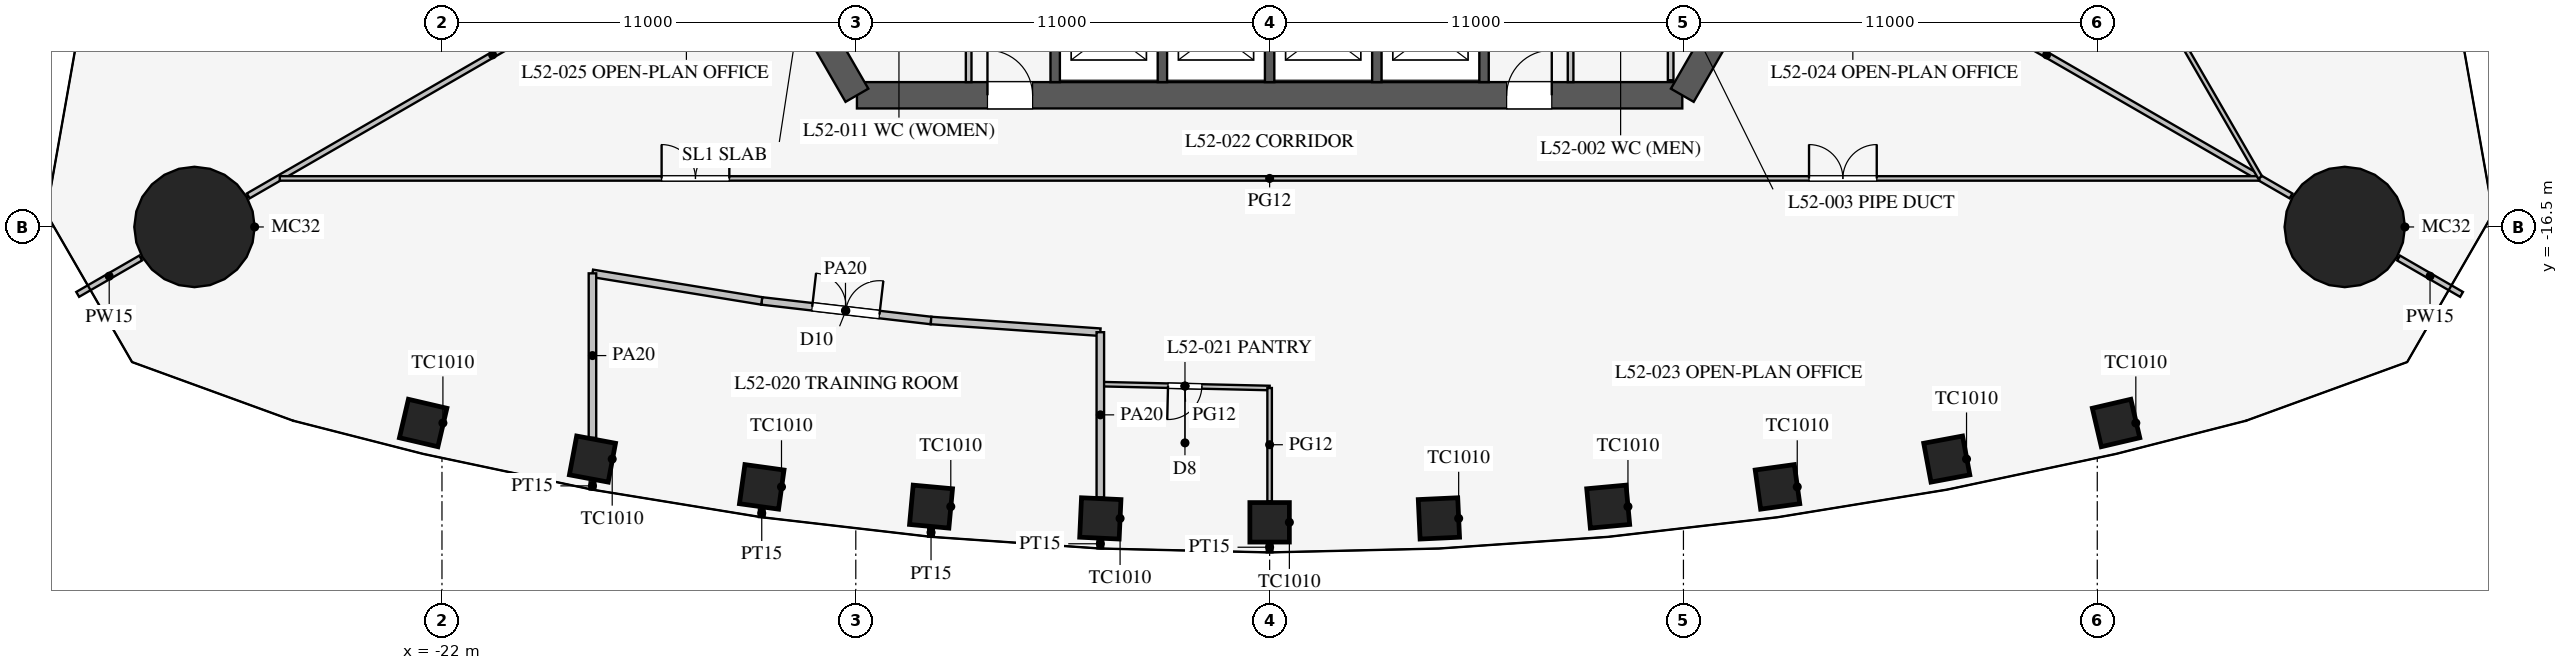
"""IFC4 building model, lengths in metres.
Left out: names, types, materials, properties, quantities, classifications, styles, units other than length and angle.
Written with IfcOpenShell. Run it as: python <this file> out.ifc"""

import sys

from ifc_helpers import new_model, si_unit, direction, frame, frame_2d, origin, origin_2d, place, context, subcontext, project, spatial, rectangle, circle, extrude, element, fill, save


model = new_model("IFC4")
c1 = context("Model", 3, precision=1e-05, world=origin(), true_north=direction((0.0, 1.0)))
c2 = subcontext(c1, "Body", "Model", "MODEL_VIEW")
j1 = project(units=[si_unit("LENGTHUNIT", "METRE"), si_unit("PLANEANGLEUNIT", "RADIAN")], contexts=[c1])
p1 = place(None, origin())
s1 = spatial("IfcSite", under=j1, at=p1, CompositionType="ELEMENT")
p2 = place(p1, origin())
s2 = spatial("IfcBuilding", under=s1, at=p2, CompositionType="ELEMENT")
p3 = place(p2, frame((0.0, 0.0, 227.5)))
s3 = spatial("IfcBuildingStorey", under=s2, at=p3, CompositionType="ELEMENT", Elevation=227.5)
for number, where, z_axis, x_axis in (
    (1, (-22.5, -21.71, 0.0), (0.0, 0.0, 1.0), (0.974, -0.227, 0.0)),
    (2, (-18.0, -22.669, 0.0), (0.0, 0.0, 1.0), (0.983, -0.184, 0.0)),
    (3, (-13.5, -23.408, 0.0), (0.0, 0.0, 1.0), (0.99, -0.138, 0.0)),
    (4, (-9.0, -23.933, 0.0), (0.0, 0.0, 1.0), (0.996, -0.092, 0.0)),
    (5, (-4.5, -24.246, 0.0), (0.0, 0.0, 1.0), (0.999, -0.046, 0.0)),
    (6, (0.0, -24.351, 0.0), (0.0, 0.0, 1.0), (1.0, 0.0, 0.0)),
    (7, (4.5, -24.246, 0.0), (0.0, 0.0, 1.0), (0.999, 0.046, 0.0)),
    (8, (9.0, -23.933, 0.0), (0.0, 0.0, 1.0), (0.996, 0.092, 0.0)),
    (9, (13.5, -23.408, 0.0), (0.0, 0.0, 1.0), (0.99, 0.138, 0.0)),
    (10, (18.0, -22.669, 0.0), (0.0, 0.0, 1.0), (0.983, 0.184, 0.0)),
    (11, (22.5, -21.71, 0.0), (0.0, 0.0, 1.0), (0.974, 0.227, 0.0)),
):
    element("IfcColumn", number, at=place(p3, frame(where, z_axis=z_axis, x_axis=x_axis)), inside=s3, PredefinedType="COLUMN", context=c2, shape_type="SweptSolid", body=[
        extrude(rectangle(XDim=1.05, YDim=1.05, at=origin_2d()), origin(), (0.0, 0.0, 1.0), 4.2),
    ])
for number, where, z_axis, x_axis in (
    (12, (28.579, -16.5, 0.0), (0.0, 0.0, 1.0), (1.0, 0.0, 0.0)),
    (13, (-28.579, -16.5, 0.0), (0.0, 0.0, 1.0), (1.0, 0.0, 0.0)),
):
    element("IfcColumn", number, at=place(p3, frame(where, z_axis=z_axis, x_axis=x_axis)), inside=s3, PredefinedType="COLUMN", context=c2, shape_type="SweptSolid", body=[
        extrude(circle(Radius=1.6, at=origin_2d()), origin(), (0.0, 0.0, 1.0), 4.2),
    ])
p4 = place(p3, frame((-10.97, -13.0, 0.0), z_axis=(0.0, 0.0, 1.0), x_axis=(1.0, 0.0, 0.0)))
e14 = element("IfcWall", 14, at=p4, inside=s3, PredefinedType="SHEAR", context=c2, shape_type="SweptSolid", body=[
    extrude(rectangle(XDim=21.939, YDim=0.7, at=frame_2d((10.97, 0.0))), origin(), (0.0, 0.0, 1.0), 4.2),
])
p5 = place(p4, frame((17.27, 0.0, 0.0)))
e15 = element("IfcOpeningElement", 15, at=p5, cuts=e14, PredefinedType="OPENING", context=c2, shape_type="SweptSolid", body=[
    extrude(rectangle(XDim=1.2, YDim=2.1, at=frame_2d((0.6, 1.05))), frame((0.0, 0.36, 0.0), z_axis=(0.0, -1.0, 0.0), x_axis=(1.0, 0.0, 0.0)), (0.0, 0.0, 1.0), 0.72),
])
p6 = place(p4, frame((3.47, 0.0, 0.0)))
e16 = element("IfcOpeningElement", 16, at=p6, cuts=e14, PredefinedType="OPENING", context=c2, shape_type="SweptSolid", body=[
    extrude(rectangle(XDim=1.2, YDim=2.1, at=frame_2d((0.6, 1.05))), frame((0.0, 0.36, 0.0), z_axis=(0.0, -1.0, 0.0), x_axis=(1.0, 0.0, 0.0)), (0.0, 0.0, 1.0), 0.72),
])
for number, where, z_axis, x_axis in (
    (17, (10.97, -13.0, 0.0), (0.0, 0.0, 1.0), (0.5, 0.866, 0.0)),
    (18, (-16.743, -3.0, 0.0), (0.0, 0.0, 1.0), (0.5, -0.866, 0.0)),
):
    element("IfcWall", number, at=place(p3, frame(where, z_axis=z_axis, x_axis=x_axis)), inside=s3, PredefinedType="SHEAR", context=c2, shape_type="SweptSolid", body=[
        extrude(rectangle(XDim=11.547, YDim=0.7, at=frame_2d((5.773, 0.0))), origin(), (0.0, 0.0, 1.0), 4.2),
    ])
for number, where, z_axis, x_axis in (
    (19, (-5.7, -10.025, 0.0), (0.0, 0.0, 1.0), (0.0, -1.0, 0.0)),
    (20, (-2.85, -10.025, 0.0), (0.0, 0.0, 1.0), (0.0, -1.0, 0.0)),
    (21, (0.0, -10.025, 0.0), (0.0, 0.0, 1.0), (0.0, -1.0, 0.0)),
    (22, (2.85, -10.025, 0.0), (0.0, 0.0, 1.0), (0.0, -1.0, 0.0)),
    (23, (5.7, -10.025, 0.0), (0.0, 0.0, 1.0), (0.0, -1.0, 0.0)),
):
    element("IfcWall", number, at=place(p3, frame(where, z_axis=z_axis, x_axis=x_axis)), inside=s3, PredefinedType="SHEAR", context=c2, shape_type="SweptSolid", body=[
        extrude(rectangle(XDim=2.625, YDim=0.25, at=frame_2d((1.312, 0.0))), origin(), (0.0, 0.0, 1.0), 4.2),
    ])
p7 = place(p3, frame((8.0, -7.5, 0.0), z_axis=(0.0, 0.0, 1.0), x_axis=(0.0, -1.0, 0.0)))
e24 = element("IfcWall", 24, at=p7, inside=s3, PredefinedType="PARTITIONING", context=c2, shape_type="SweptSolid", body=[
    extrude(rectangle(XDim=5.15, YDim=0.15, at=frame_2d((2.575, 0.0))), origin(), (0.0, 0.0, 1.0), 4.0),
])
p8 = place(p7, frame((1.3, 0.0, 0.0)))
e25 = element("IfcOpeningElement", 25, at=p8, cuts=e24, PredefinedType="OPENING", context=c2, shape_type="SweptSolid", body=[
    extrude(rectangle(XDim=0.9, YDim=2.1, at=frame_2d((0.45, 1.05))), frame((0.0, 0.085, 0.0), z_axis=(0.0, -1.0, 0.0), x_axis=(1.0, 0.0, 0.0)), (0.0, 0.0, 1.0), 0.17),
])
p9 = place(p3, frame((-8.0, -7.5, 0.0), z_axis=(0.0, 0.0, 1.0), x_axis=(0.0, -1.0, 0.0)))
e26 = element("IfcWall", 26, at=p9, inside=s3, PredefinedType="PARTITIONING", context=c2, shape_type="SweptSolid", body=[
    extrude(rectangle(XDim=5.15, YDim=0.15, at=frame_2d((2.575, 0.0))), origin(), (0.0, 0.0, 1.0), 4.0),
])
p10 = place(p9, frame((2.6, 0.0, 0.0)))
e27 = element("IfcOpeningElement", 27, at=p10, cuts=e26, PredefinedType="OPENING", context=c2, shape_type="SweptSolid", body=[
    extrude(rectangle(XDim=0.9, YDim=2.1, at=frame_2d((0.45, 1.05))), frame((0.0, 0.085, 0.0), z_axis=(0.0, -1.0, 0.0), x_axis=(1.0, 0.0, 0.0)), (0.0, 0.0, 1.0), 0.17),
])
p11 = place(p3, frame((10.66, -8.5, 0.0), z_axis=(0.0, 0.0, 1.0), x_axis=(0.0, -1.0, 0.0)))
e28 = element("IfcWall", 28, at=p11, inside=s3, PredefinedType="PARTITIONING", context=c2, shape_type="SweptSolid", body=[
    extrude(rectangle(XDim=4.1, YDim=0.15, at=frame_2d((2.05, 0.0))), origin(), (0.0, 0.0, 1.0), 4.0),
])
p12 = place(p3, frame((14.159, -8.175, 0.0), z_axis=(0.0, 0.0, 1.0), x_axis=(0.866027028085, -0.499997186618, 0.0)))
e29 = element("IfcWall", 29, at=p12, inside=s3, PredefinedType="PARTITIONING", context=c2, shape_type="SweptSolid", body=[
    extrude(rectangle(XDim=15.0, YDim=0.15, at=frame_2d((7.5, 0.0))), origin(), (0.0, 0.0, 1.0), 2.4),
])
p13 = place(p3, frame((30.008, -17.325, 0.0), z_axis=(0.0, 0.0, 1.0), x_axis=(0.866013246922, -0.500021055713, 0.0)))
e30 = element("IfcWall", 30, at=p13, inside=s3, PredefinedType="PARTITIONING", context=c2, shape_type="SweptSolid", body=[
    extrude(rectangle(XDim=1.935, YDim=0.15, at=frame_2d((0.967, 0.0))), origin(), (0.0, 0.0, 1.0), 2.4),
])
p14 = place(p3, frame((-14.159, -8.175, 0.0), z_axis=(0.0, 0.0, 1.0), x_axis=(-0.866027028085, -0.499997186618, 0.0)))
e31 = element("IfcWall", 31, at=p14, inside=s3, PredefinedType="PARTITIONING", context=c2, shape_type="SweptSolid", body=[
    extrude(rectangle(XDim=15.0, YDim=0.15, at=frame_2d((7.5, 0.0))), origin(), (0.0, 0.0, 1.0), 2.4),
])
p15 = place(p3, frame((-30.008, -17.325, 0.0), z_axis=(0.0, 0.0, 1.0), x_axis=(-0.866013246922, -0.500021055713, 0.0)))
e32 = element("IfcWall", 32, at=p15, inside=s3, PredefinedType="PARTITIONING", context=c2, shape_type="SweptSolid", body=[
    extrude(rectangle(XDim=1.935, YDim=0.15, at=frame_2d((0.967, 0.0))), origin(), (0.0, 0.0, 1.0), 2.4),
])
p16 = place(p3, frame((-26.312, -15.21, 0.0), z_axis=(0.0, 0.0, 1.0), x_axis=(1.0, 0.0, 0.0)))
e33 = element("IfcWall", 33, at=p16, inside=s3, PredefinedType="PARTITIONING", context=c2, shape_type="SweptSolid", body=[
    extrude(rectangle(XDim=52.624, YDim=0.12, at=frame_2d((26.312, 0.0))), origin(), (0.0, 0.0, 1.0), 2.9),
])
p17 = place(p16, frame((10.15, 0.0, 0.15)))
e34 = element("IfcOpeningElement", 34, at=p17, cuts=e33, PredefinedType="OPENING", context=c2, shape_type="SweptSolid", body=[
    extrude(rectangle(XDim=1.8, YDim=2.1, at=frame_2d((0.9, 1.05))), frame((0.0, 0.07, 0.0), z_axis=(0.0, -1.0, 0.0), x_axis=(1.0, 0.0, 0.0)), (0.0, 0.0, 1.0), 0.14),
])
p18 = place(p16, frame((40.65, 0.0, 0.15)))
e35 = element("IfcOpeningElement", 35, at=p18, cuts=e33, PredefinedType="OPENING", context=c2, shape_type="SweptSolid", body=[
    extrude(rectangle(XDim=1.8, YDim=2.1, at=frame_2d((0.9, 1.05))), frame((0.0, 0.07, 0.0), z_axis=(0.0, -1.0, 0.0), x_axis=(1.0, 0.0, 0.0)), (0.0, 0.0, 1.0), 0.14),
])
p19 = place(p3, frame((0.0, -24.88, 0.0), z_axis=(0.0, 0.0, 1.0), x_axis=(0.0, -1.0, 0.0)))
e36 = element("IfcWall", 36, at=p19, inside=s3, PredefinedType="PARTITIONING", context=c2, shape_type="SweptSolid", body=[
    extrude(rectangle(XDim=0.266, YDim=0.15, at=frame_2d((0.133, 0.0))), origin(), (0.0, 0.0, 1.0), 2.9),
])
p20 = place(p3, frame((-13.5, -24.005, 0.0), z_axis=(0.0, 0.0, 1.0), x_axis=(0.0, -1.0, 0.0)))
e37 = element("IfcWall", 37, at=p20, inside=s3, PredefinedType="PARTITIONING", context=c2, shape_type="SweptSolid", body=[
    extrude(rectangle(XDim=0.206, YDim=0.15, at=frame_2d((0.103, 0.0))), origin(), (0.0, 0.0, 1.0), 2.9),
])
p21 = place(p3, frame((-18.0, -23.286, 0.0), z_axis=(0.0, 0.0, 1.0), x_axis=(0.0, -1.0, 0.0)))
e38 = element("IfcWall", 38, at=p21, inside=s3, PredefinedType="PARTITIONING", context=c2, shape_type="SweptSolid", body=[
    extrude(rectangle(XDim=0.192, YDim=0.15, at=frame_2d((0.096, 0.0))), origin(), (0.0, 0.0, 1.0), 2.9),
])
p22 = place(p3, frame((-4.5, -24.799, 0.0), z_axis=(0.0, 0.0, 1.0), x_axis=(0.0, -1.0, 0.0)))
e39 = element("IfcWall", 39, at=p22, inside=s3, PredefinedType="PARTITIONING", context=c2, shape_type="SweptSolid", body=[
    extrude(rectangle(XDim=0.243, YDim=0.15, at=frame_2d((0.122, 0.0))), origin(), (0.0, 0.0, 1.0), 2.9),
])
p23 = place(p3, frame((-9.0, -24.508, 0.0), z_axis=(0.0, 0.0, 1.0), x_axis=(0.0, -1.0, 0.0)))
e40 = element("IfcWall", 40, at=p23, inside=s3, PredefinedType="PARTITIONING", context=c2, shape_type="SweptSolid", body=[
    extrude(rectangle(XDim=0.223, YDim=0.15, at=frame_2d((0.112, 0.0))), origin(), (0.0, 0.0, 1.0), 2.9),
])
p24 = place(p3, frame((-13.5, -18.466, 0.0), z_axis=(0.0, 0.0, 1.0), x_axis=(0.993382946625, -0.114849124309, 0.0)))
e41 = element("IfcWall", 41, at=p24, inside=s3, PredefinedType="PARTITIONING", context=c2, shape_type="SweptSolid", body=[
    extrude(rectangle(XDim=4.53, YDim=0.2, at=frame_2d((2.265, 0.0))), origin(), (0.0, 0.0, 1.0), 2.9),
])
p25 = place(p24, frame((1.35, 0.0, 0.15)))
e42 = element("IfcOpeningElement", 42, at=p25, cuts=e41, PredefinedType="OPENING", context=c2, shape_type="SweptSolid", body=[
    extrude(rectangle(XDim=1.8, YDim=2.1, at=frame_2d((0.9, 1.05))), frame((0.0, 0.11, 0.0), z_axis=(0.0, -1.0, 0.0), x_axis=(1.0, 0.0, 0.0)), (0.0, 0.0, 1.0), 0.22),
])
p26 = place(p3, frame((-18.0, -17.733, 0.0), z_axis=(0.0, 0.0, 1.0), x_axis=(0.986986525477, -0.160802980469, 0.0)))
e43 = element("IfcWall", 43, at=p26, inside=s3, PredefinedType="PARTITIONING", context=c2, shape_type="SweptSolid", body=[
    extrude(rectangle(XDim=4.559, YDim=0.2, at=frame_2d((2.28, 0.0))), origin(), (0.0, 0.0, 1.0), 2.9),
])
p27 = place(p3, frame((-4.5, -20.677, 0.0), z_axis=(0.0, 0.0, 1.0), x_axis=(0.99973677065, -0.022943177842, 0.0)))
e44 = element("IfcWall", 44, at=p27, inside=s3, PredefinedType="PARTITIONING", context=c2, shape_type="SweptSolid", body=[
    extrude(rectangle(XDim=4.501, YDim=0.12, at=frame_2d((2.25, 0.0))), origin(), (0.0, 0.0, 1.0), 2.9),
])
p28 = place(p27, frame((1.8, 0.0, 0.15)))
e45 = element("IfcOpeningElement", 45, at=p28, cuts=e44, PredefinedType="OPENING", context=c2, shape_type="SweptSolid", body=[
    extrude(rectangle(XDim=0.9, YDim=2.1, at=frame_2d((0.45, 1.05))), frame((0.0, 0.07, 0.0), z_axis=(0.0, -1.0, 0.0), x_axis=(1.0, 0.0, 0.0)), (0.0, 0.0, 1.0), 0.14),
])
p29 = place(p3, frame((-9.0, -18.986, 0.0), z_axis=(0.0, 0.0, 1.0), x_axis=(0.997623533978, -0.068900540297, 0.0)))
e46 = element("IfcWall", 46, at=p29, inside=s3, PredefinedType="PARTITIONING", context=c2, shape_type="SweptSolid", body=[
    extrude(rectangle(XDim=4.511, YDim=0.2, at=frame_2d((2.255, 0.0))), origin(), (0.0, 0.0, 1.0), 2.9),
])
p30 = place(p3, frame((0.0, -20.781, 0.0), z_axis=(0.0, 0.0, 1.0), x_axis=(0.0, -1.0, 0.0)))
e47 = element("IfcWall", 47, at=p30, inside=s3, PredefinedType="PARTITIONING", context=c2, shape_type="SweptSolid", body=[
    extrude(rectangle(XDim=3.015, YDim=0.12, at=frame_2d((1.508, 0.0))), origin(), (0.0, 0.0, 1.0), 2.9),
])
p31 = place(p3, frame((-18.0, -17.733, 0.0), z_axis=(0.0, 0.0, 1.0), x_axis=(0.0, -1.0, 0.0)))
e48 = element("IfcWall", 48, at=p31, inside=s3, PredefinedType="PARTITIONING", context=c2, shape_type="SweptSolid", body=[
    extrude(rectangle(XDim=4.372, YDim=0.2, at=frame_2d((2.186, 0.0))), origin(), (0.0, 0.0, 1.0), 2.9),
])
p32 = place(p3, frame((-4.5, -19.297, 0.0), z_axis=(0.0, 0.0, 1.0), x_axis=(0.0, -1.0, 0.0)))
e49 = element("IfcWall", 49, at=p32, inside=s3, PredefinedType="PARTITIONING", context=c2, shape_type="SweptSolid", body=[
    extrude(rectangle(XDim=4.394, YDim=0.2, at=frame_2d((2.197, 0.0))), origin(), (0.0, 0.0, 1.0), 2.9),
])
p33 = place(p3, frame((26.328, -15.182, 0.0), z_axis=(0.0, 0.0, 1.0), x_axis=(-0.500000626146, 0.866025042278, 0.0)))
e50 = element("IfcWall", 50, at=p33, inside=s3, PredefinedType="PARTITIONING", context=c2, shape_type="SweptSolid", body=[
    extrude(rectangle(XDim=52.624, YDim=0.12, at=frame_2d((26.312, 0.0))), origin(), (0.0, 0.0, 1.0), 2.9),
])
p34 = place(p33, frame((10.15, 0.0, 0.15)))
e51 = element("IfcOpeningElement", 51, at=p34, cuts=e50, PredefinedType="OPENING", context=c2, shape_type="SweptSolid", body=[
    extrude(rectangle(XDim=1.8, YDim=2.1, at=frame_2d((0.9, 1.05))), frame((0.0, 0.07, 0.0), z_axis=(0.0, -1.0, 0.0), x_axis=(1.0, 0.0, 0.0)), (0.0, 0.0, 1.0), 0.14),
])
p35 = place(p33, frame((40.65, 0.0, 0.15)))
e52 = element("IfcOpeningElement", 52, at=p35, cuts=e50, PredefinedType="OPENING", context=c2, shape_type="SweptSolid", body=[
    extrude(rectangle(XDim=1.8, YDim=2.1, at=frame_2d((0.9, 1.05))), frame((0.0, 0.07, 0.0), z_axis=(0.0, -1.0, 0.0), x_axis=(1.0, 0.0, 0.0)), (0.0, 0.0, 1.0), 0.14),
])
p36 = place(p5, origin())
e53 = element("IfcDoor", 53, at=p36, inside=s3, OperationType="SINGLE_SWING_RIGHT", PredefinedType="DOOR", context=c2, shape_type="SweptSolid", body=[
    extrude(rectangle(XDim=1.2, YDim=2.1, at=frame_2d((0.6, 1.05))), frame((0.0, 0.025, 0.0), z_axis=(0.0, -1.0, 0.0), x_axis=(1.0, 0.0, 0.0)), (0.0, 0.0, 1.0), 0.05),
])
fill(e15, e53)
p37 = place(p6, origin())
e54 = element("IfcDoor", 54, at=p37, inside=s3, OperationType="SINGLE_SWING_LEFT", PredefinedType="DOOR", context=c2, shape_type="SweptSolid", body=[
    extrude(rectangle(XDim=1.2, YDim=2.1, at=frame_2d((0.6, 1.05))), frame((0.0, 0.025, 0.0), z_axis=(0.0, -1.0, 0.0), x_axis=(1.0, 0.0, 0.0)), (0.0, 0.0, 1.0), 0.05),
])
fill(e16, e54)
p38 = place(p25, origin())
e55 = element("IfcDoor", 55, at=p38, inside=s3, OperationType="DOUBLE_DOOR_SINGLE_SWING", PredefinedType="DOOR", context=c2, shape_type="SweptSolid", body=[
    extrude(rectangle(XDim=1.8, YDim=2.1, at=frame_2d((0.9, 1.05))), frame((0.0, 0.025, 0.0), z_axis=(0.0, -1.0, 0.0), x_axis=(1.0, 0.0, 0.0)), (0.0, 0.0, 1.0), 0.05),
])
fill(e42, e55)
p39 = place(p28, frame((0.9, 0.0, 0.0), z_axis=(0.0, 0.0, 1.0), x_axis=(-1.0, 0.0, 0.0)))
e56 = element("IfcDoor", 56, at=p39, inside=s3, OperationType="SINGLE_SWING_RIGHT", PredefinedType="DOOR", context=c2, shape_type="SweptSolid", body=[
    extrude(rectangle(XDim=0.9, YDim=2.1, at=frame_2d((0.45, 1.05))), frame((0.0, 0.025, 0.0), z_axis=(0.0, -1.0, 0.0), x_axis=(1.0, 0.0, 0.0)), (0.0, 0.0, 1.0), 0.05),
])
fill(e45, e56)
p40 = place(p17, origin())
e57 = element("IfcDoor", 57, at=p40, inside=s3, OperationType="DOUBLE_DOOR_SINGLE_SWING", PredefinedType="DOOR", context=c2, shape_type="SweptSolid", body=[
    extrude(rectangle(XDim=1.8, YDim=2.1, at=frame_2d((0.9, 1.05))), frame((0.0, 0.025, 0.0), z_axis=(0.0, -1.0, 0.0), x_axis=(1.0, 0.0, 0.0)), (0.0, 0.0, 1.0), 0.05),
])
fill(e34, e57)
p41 = place(p18, origin())
e58 = element("IfcDoor", 58, at=p41, inside=s3, OperationType="DOUBLE_DOOR_SINGLE_SWING", PredefinedType="DOOR", context=c2, shape_type="SweptSolid", body=[
    extrude(rectangle(XDim=1.8, YDim=2.1, at=frame_2d((0.9, 1.05))), frame((0.0, 0.025, 0.0), z_axis=(0.0, -1.0, 0.0), x_axis=(1.0, 0.0, 0.0)), (0.0, 0.0, 1.0), 0.05),
])
fill(e35, e58)
save(model, sys.argv[1])
